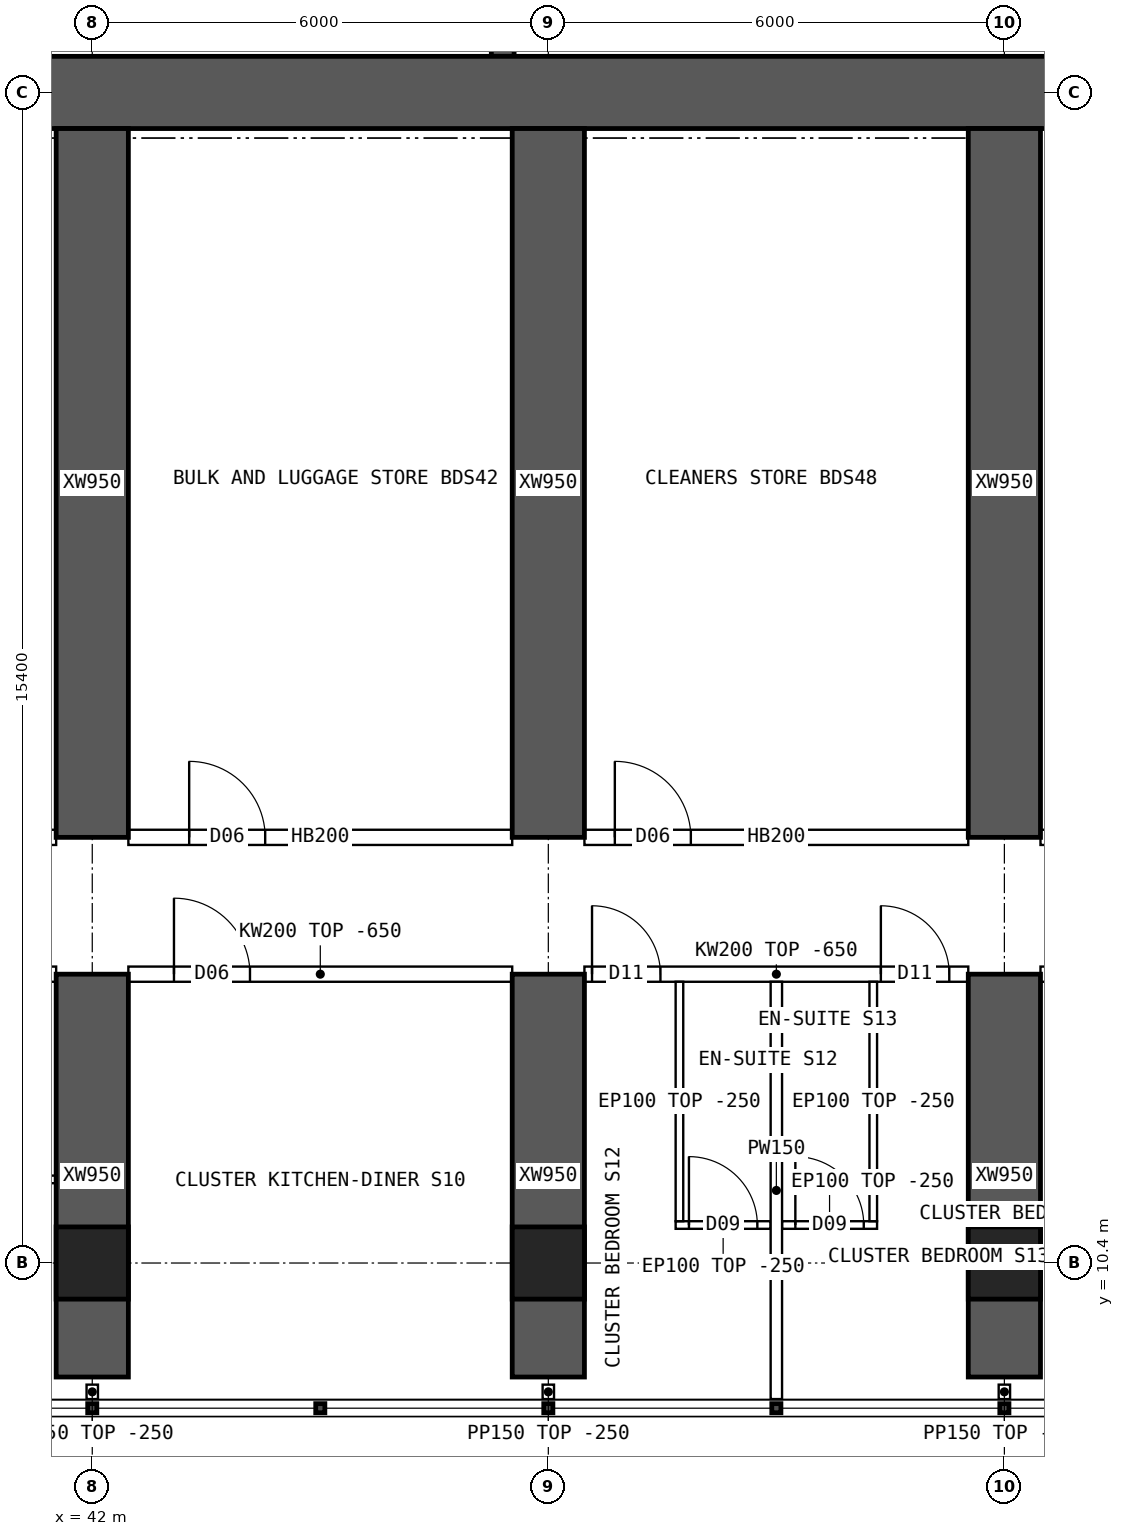
"""IFC4 building model, lengths in metres.
Left out: names, types, materials, properties, quantities, classifications, styles, units other than length and angle.
Written with IfcOpenShell. Run it as: python <this file> out.ifc"""

import sys

from ifc_helpers import new_model, si_unit, direction, frame, frame_2d, origin, origin_2d, place, context, subcontext, project, spatial, polyline, rectangle, hollow_rectangle, outline, extrude, element, fill, save


model = new_model("IFC4")
c1 = context("Model", 3, precision=1e-05, world=origin(), true_north=direction((0.0, 1.0)))
c2 = subcontext(c1, "Body", "Model", "MODEL_VIEW")
j1 = project(units=[si_unit("LENGTHUNIT", "METRE"), si_unit("PLANEANGLEUNIT", "RADIAN")], contexts=[c1])
p1 = place(None, origin())
s1 = spatial("IfcSite", under=j1, at=p1, CompositionType="ELEMENT")
p2 = place(p1, origin())
s2 = spatial("IfcBuilding", under=s1, at=p2, CompositionType="ELEMENT")
p3 = place(p2, frame((0.0, 0.0, 118.15)))
s3 = spatial("IfcBuildingStorey", under=s2, at=p3, CompositionType="ELEMENT", Elevation=118.15)
for number, where, z_axis, x_axis in (
    (1, (42.0, 10.4, 0.0), (0.0, 0.0, 1.0), (1.0, 0.0, 0.0)),
    (2, (48.0, 10.4, 0.0), (0.0, 0.0, 1.0), (1.0, 0.0, 0.0)),
    (3, (54.0, 10.4, 0.0), (0.0, 0.0, 1.0), (1.0, 0.0, 0.0)),
):
    element("IfcColumn", number, at=place(p3, frame(where, z_axis=z_axis, x_axis=x_axis)), inside=s3, PredefinedType="COLUMN", context=c2, shape_type="SweptSolid", body=[
        extrude(hollow_rectangle(XDim=0.95, YDim=0.95, WallThickness=0.095, at=origin_2d()), origin(), (0.0, 0.0, 1.0), 3.75),
    ])
p4 = place(p3, frame((18.0, 25.8, 0.0), z_axis=(0.0, 0.0, 1.0), x_axis=(1.0, 0.0, 0.0)))
e4 = element("IfcWall", 4, at=p4, inside=s3, PredefinedType="SHEAR", context=c2, shape_type="SweptSolid", body=[
    extrude(rectangle(XDim=48.0, YDim=0.95, at=frame_2d((24.0, 0.0))), origin(), (0.0, 0.0, 1.0), 3.75),
])
p5 = place(p3, frame((47.4, 26.275, 0.0), z_axis=(0.0, 0.0, 1.0), x_axis=(0.0, 1.0, 0.0)))
e5 = element("IfcWall", 5, at=p5, inside=s3, PredefinedType="SHEAR", context=c2, shape_type="SweptSolid", body=[
    extrude(rectangle(XDim=3.975, YDim=0.3, at=frame_2d((1.988, 0.0))), origin(), (0.0, 0.0, 1.0), 3.75),
])
p6 = place(p3, frame((42.0, 8.9, 0.0), z_axis=(0.0, 0.0, 1.0), x_axis=(0.0, 1.0, 0.0)))
e6 = element("IfcWall", 6, at=p6, inside=s3, PredefinedType="SHEAR", context=c2, shape_type="SweptSolid", body=[
    extrude(rectangle(XDim=5.3, YDim=0.95, at=frame_2d((2.65, 0.0))), origin(), (0.0, 0.0, 1.0), 3.75),
])
p7 = place(p3, frame((42.0, 16.0, 0.0), z_axis=(0.0, 0.0, 1.0), x_axis=(0.0, 1.0, 0.0)))
e7 = element("IfcWall", 7, at=p7, inside=s3, PredefinedType="SHEAR", context=c2, shape_type="SweptSolid", body=[
    extrude(rectangle(XDim=9.325, YDim=0.95, at=frame_2d((4.663, 0.0))), origin(), (0.0, 0.0, 1.0), 3.75),
])
p8 = place(p3, frame((48.0, 8.9, 0.0), z_axis=(0.0, 0.0, 1.0), x_axis=(0.0, 1.0, 0.0)))
e8 = element("IfcWall", 8, at=p8, inside=s3, PredefinedType="SHEAR", context=c2, shape_type="SweptSolid", body=[
    extrude(rectangle(XDim=5.3, YDim=0.95, at=frame_2d((2.65, 0.0))), origin(), (0.0, 0.0, 1.0), 3.75),
])
p9 = place(p3, frame((48.0, 16.0, 0.0), z_axis=(0.0, 0.0, 1.0), x_axis=(0.0, 1.0, 0.0)))
e9 = element("IfcWall", 9, at=p9, inside=s3, PredefinedType="SHEAR", context=c2, shape_type="SweptSolid", body=[
    extrude(rectangle(XDim=9.325, YDim=0.95, at=frame_2d((4.663, 0.0))), origin(), (0.0, 0.0, 1.0), 3.75),
])
p10 = place(p3, frame((54.0, 8.9, 0.0), z_axis=(0.0, 0.0, 1.0), x_axis=(0.0, 1.0, 0.0)))
e10 = element("IfcWall", 10, at=p10, inside=s3, PredefinedType="SHEAR", context=c2, shape_type="SweptSolid", body=[
    extrude(rectangle(XDim=5.3, YDim=0.95, at=frame_2d((2.65, 0.0))), origin(), (0.0, 0.0, 1.0), 3.75),
])
p11 = place(p3, frame((54.0, 16.0, 0.0), z_axis=(0.0, 0.0, 1.0), x_axis=(0.0, 1.0, 0.0)))
e11 = element("IfcWall", 11, at=p11, inside=s3, PredefinedType="SHEAR", context=c2, shape_type="SweptSolid", body=[
    extrude(rectangle(XDim=9.325, YDim=0.95, at=frame_2d((4.663, 0.0))), origin(), (0.0, 0.0, 1.0), 3.75),
])
p12 = place(p3, frame((36.475, 14.2, 0.0), z_axis=(0.0, 0.0, 1.0), x_axis=(1.0, 0.0, 0.0)))
e12 = element("IfcWall", 12, at=p12, inside=s3, PredefinedType="SOLIDWALL", context=c2, shape_type="SweptSolid", body=[
    extrude(outline(polyline([(0.0, 0.0), (5.05, 0.0), (5.05, 3.1), (0.0, 3.1), (0.0, 0.0)])), frame((0.0, 0.1, 0.0), z_axis=(0.0, -1.0, 0.0), x_axis=(1.0, 0.0, 0.0)), (0.0, 0.0, 1.0), 0.2),
])
p13 = place(p12, frame((0.3, 0.0, 0.0)))
e13 = element("IfcOpeningElement", 13, at=p13, cuts=e12, PredefinedType="OPENING", context=c2, shape_type="SweptSolid", body=[
    extrude(rectangle(XDim=1.0, YDim=2.1, at=frame_2d((0.5, 1.05))), frame((0.0, 0.11, 0.0), z_axis=(0.0, -1.0, 0.0), x_axis=(1.0, 0.0, 0.0)), (0.0, 0.0, 1.0), 0.22),
])
p14 = place(p3, frame((36.475, 16.0, 0.0), z_axis=(0.0, 0.0, 1.0), x_axis=(1.0, 0.0, 0.0)))
e14 = element("IfcWall", 14, at=p14, inside=s3, PredefinedType="SOLIDWALL", context=c2, shape_type="SweptSolid", body=[
    extrude(rectangle(XDim=5.05, YDim=0.2, at=frame_2d((2.525, 0.0))), origin(), (0.0, 0.0, 1.0), 3.5),
])
p15 = place(p14, frame((0.15, 0.0, 0.0)))
e15 = element("IfcOpeningElement", 15, at=p15, cuts=e14, PredefinedType="OPENING", context=c2, shape_type="SweptSolid", body=[
    extrude(rectangle(XDim=0.9, YDim=2.1, at=frame_2d((0.45, 1.05))), frame((0.0, 0.11, 0.0), z_axis=(0.0, -1.0, 0.0), x_axis=(1.0, 0.0, 0.0)), (0.0, 0.0, 1.0), 0.22),
])
p16 = place(p14, frame((2.615, 0.0, 0.0)))
e16 = element("IfcOpeningElement", 16, at=p16, cuts=e14, PredefinedType="OPENING", context=c2, shape_type="SweptSolid", body=[
    extrude(rectangle(XDim=0.9, YDim=2.1, at=frame_2d((0.45, 1.05))), frame((0.0, 0.11, 0.0), z_axis=(0.0, -1.0, 0.0), x_axis=(1.0, 0.0, 0.0)), (0.0, 0.0, 1.0), 0.22),
])
p17 = place(p3, frame((42.475, 14.2, 0.0), z_axis=(0.0, 0.0, 1.0), x_axis=(1.0, 0.0, 0.0)))
e17 = element("IfcWall", 17, at=p17, inside=s3, PredefinedType="SOLIDWALL", context=c2, shape_type="SweptSolid", body=[
    extrude(outline(polyline([(0.0, 0.0), (5.05, 0.0), (5.05, 3.1), (0.0, 3.1), (0.0, 0.0)])), frame((0.0, 0.1, 0.0), z_axis=(0.0, -1.0, 0.0), x_axis=(1.0, 0.0, 0.0)), (0.0, 0.0, 1.0), 0.2),
])
p18 = place(p17, frame((0.6, 0.0, 0.0)))
e18 = element("IfcOpeningElement", 18, at=p18, cuts=e17, PredefinedType="OPENING", context=c2, shape_type="SweptSolid", body=[
    extrude(rectangle(XDim=1.0, YDim=2.1, at=frame_2d((0.5, 1.05))), frame((0.0, 0.11, 0.0), z_axis=(0.0, -1.0, 0.0), x_axis=(1.0, 0.0, 0.0)), (0.0, 0.0, 1.0), 0.22),
])
p19 = place(p3, frame((42.475, 16.0, 0.0), z_axis=(0.0, 0.0, 1.0), x_axis=(1.0, 0.0, 0.0)))
e19 = element("IfcWall", 19, at=p19, inside=s3, PredefinedType="SOLIDWALL", context=c2, shape_type="SweptSolid", body=[
    extrude(rectangle(XDim=5.05, YDim=0.2, at=frame_2d((2.525, 0.0))), origin(), (0.0, 0.0, 1.0), 3.5),
])
p20 = place(p19, frame((0.8, 0.0, 0.0)))
e20 = element("IfcOpeningElement", 20, at=p20, cuts=e19, PredefinedType="OPENING", context=c2, shape_type="SweptSolid", body=[
    extrude(rectangle(XDim=1.0, YDim=2.1, at=frame_2d((0.5, 1.05))), frame((0.0, 0.11, 0.0), z_axis=(0.0, -1.0, 0.0), x_axis=(1.0, 0.0, 0.0)), (0.0, 0.0, 1.0), 0.22),
])
p21 = place(p3, frame((48.475, 14.2, 0.0), z_axis=(0.0, 0.0, 1.0), x_axis=(1.0, 0.0, 0.0)))
e21 = element("IfcWall", 21, at=p21, inside=s3, PredefinedType="SOLIDWALL", context=c2, shape_type="SweptSolid", body=[
    extrude(outline(polyline([(0.0, 0.0), (5.05, 0.0), (5.05, 3.1), (0.0, 3.1), (0.0, 0.0)])), frame((0.0, 0.1, 0.0), z_axis=(0.0, -1.0, 0.0), x_axis=(1.0, 0.0, 0.0)), (0.0, 0.0, 1.0), 0.2),
])
p22 = place(p21, frame((0.1, 0.0, 0.0)))
e22 = element("IfcOpeningElement", 22, at=p22, cuts=e21, PredefinedType="OPENING", context=c2, shape_type="SweptSolid", body=[
    extrude(rectangle(XDim=0.9, YDim=2.1, at=frame_2d((0.45, 1.05))), frame((0.0, 0.11, 0.0), z_axis=(0.0, -1.0, 0.0), x_axis=(1.0, 0.0, 0.0)), (0.0, 0.0, 1.0), 0.22),
])
p23 = place(p21, frame((3.9, 0.0, 0.0)))
e23 = element("IfcOpeningElement", 23, at=p23, cuts=e21, PredefinedType="OPENING", context=c2, shape_type="SweptSolid", body=[
    extrude(rectangle(XDim=0.9, YDim=2.1, at=frame_2d((0.45, 1.05))), frame((0.0, 0.11, 0.0), z_axis=(0.0, -1.0, 0.0), x_axis=(1.0, 0.0, 0.0)), (0.0, 0.0, 1.0), 0.22),
])
p24 = place(p3, frame((48.475, 16.0, 0.0), z_axis=(0.0, 0.0, 1.0), x_axis=(1.0, 0.0, 0.0)))
e24 = element("IfcWall", 24, at=p24, inside=s3, PredefinedType="SOLIDWALL", context=c2, shape_type="SweptSolid", body=[
    extrude(rectangle(XDim=5.05, YDim=0.2, at=frame_2d((2.525, 0.0))), origin(), (0.0, 0.0, 1.0), 3.5),
])
p25 = place(p24, frame((0.4, 0.0, 0.0)))
e25 = element("IfcOpeningElement", 25, at=p25, cuts=e24, PredefinedType="OPENING", context=c2, shape_type="SweptSolid", body=[
    extrude(rectangle(XDim=1.0, YDim=2.1, at=frame_2d((0.5, 1.05))), frame((0.0, 0.11, 0.0), z_axis=(0.0, -1.0, 0.0), x_axis=(1.0, 0.0, 0.0)), (0.0, 0.0, 1.0), 0.22),
])
p26 = place(p3, frame((54.475, 14.2, 0.0), z_axis=(0.0, 0.0, 1.0), x_axis=(1.0, 0.0, 0.0)))
e26 = element("IfcWall", 26, at=p26, inside=s3, PredefinedType="SOLIDWALL", context=c2, shape_type="SweptSolid", body=[
    extrude(outline(polyline([(0.0, 0.0), (5.05, 0.0), (5.05, 3.1), (0.0, 3.1), (0.0, 0.0)])), frame((0.0, 0.1, 0.0), z_axis=(0.0, -1.0, 0.0), x_axis=(1.0, 0.0, 0.0)), (0.0, 0.0, 1.0), 0.2),
])
p27 = place(p26, frame((0.1, 0.0, 0.0)))
e27 = element("IfcOpeningElement", 27, at=p27, cuts=e26, PredefinedType="OPENING", context=c2, shape_type="SweptSolid", body=[
    extrude(rectangle(XDim=0.9, YDim=2.1, at=frame_2d((0.45, 1.05))), frame((0.0, 0.11, 0.0), z_axis=(0.0, -1.0, 0.0), x_axis=(1.0, 0.0, 0.0)), (0.0, 0.0, 1.0), 0.22),
])
p28 = place(p26, frame((3.9, 0.0, 0.0)))
e28 = element("IfcOpeningElement", 28, at=p28, cuts=e26, PredefinedType="OPENING", context=c2, shape_type="SweptSolid", body=[
    extrude(rectangle(XDim=0.9, YDim=2.1, at=frame_2d((0.45, 1.05))), frame((0.0, 0.11, 0.0), z_axis=(0.0, -1.0, 0.0), x_axis=(1.0, 0.0, 0.0)), (0.0, 0.0, 1.0), 0.22),
])
p29 = place(p3, frame((54.475, 16.0, 0.0), z_axis=(0.0, 0.0, 1.0), x_axis=(1.0, 0.0, 0.0)))
e29 = element("IfcWall", 29, at=p29, inside=s3, PredefinedType="SOLIDWALL", context=c2, shape_type="SweptSolid", body=[
    extrude(rectangle(XDim=5.05, YDim=0.2, at=frame_2d((2.525, 0.0))), origin(), (0.0, 0.0, 1.0), 3.5),
])
p30 = place(p29, frame((0.35, 0.0, 0.0)))
e30 = element("IfcOpeningElement", 30, at=p30, cuts=e29, PredefinedType="OPENING", context=c2, shape_type="SweptSolid", body=[
    extrude(rectangle(XDim=0.9, YDim=2.1, at=frame_2d((0.45, 1.05))), frame((0.0, 0.11, 0.0), z_axis=(0.0, -1.0, 0.0), x_axis=(1.0, 0.0, 0.0)), (0.0, 0.0, 1.0), 0.22),
])
p31 = place(p29, frame((2.805, 0.0, 0.0)))
e31 = element("IfcOpeningElement", 31, at=p31, cuts=e29, PredefinedType="OPENING", context=c2, shape_type="SweptSolid", body=[
    extrude(rectangle(XDim=0.9, YDim=2.1, at=frame_2d((0.45, 1.05))), frame((0.0, 0.11, 0.0), z_axis=(0.0, -1.0, 0.0), x_axis=(1.0, 0.0, 0.0)), (0.0, 0.0, 1.0), 0.22),
])
p32 = place(p3, frame((38.875, 11.5, 0.0), z_axis=(0.0, 0.0, 1.0), x_axis=(1.0, 0.0, 0.0)))
e32 = element("IfcWall", 32, at=p32, inside=s3, PredefinedType="PARTITIONING", context=c2, shape_type="SweptSolid", body=[
    extrude(rectangle(XDim=2.65, YDim=0.1, at=frame_2d((1.325, 0.0))), origin(), (0.0, 0.0, 1.0), 3.5),
])
p33 = place(p3, frame((51.0, 8.61, 0.0), z_axis=(0.0, 0.0, 1.0), x_axis=(0.0, 1.0, 0.0)))
e33 = element("IfcWall", 33, at=p33, inside=s3, PredefinedType="PARTITIONING", context=c2, shape_type="SweptSolid", body=[
    extrude(outline(polyline([(0.0, 0.0), (5.49, 0.0), (5.49, 3.1), (5.442, 3.1), (5.44, 3.5), (1.992, 3.5), (1.99, 3.1), (1.592, 3.1), (1.59, 3.5), (0.0, 3.5), (0.0, 0.0)])), frame((0.0, 0.075, 0.0), z_axis=(0.0, -1.0, 0.0), x_axis=(1.0, 0.0, 0.0)), (0.0, 0.0, 1.0), 0.15),
])
p34 = place(p3, frame((50.925, 10.9, 0.0), z_axis=(0.0, 0.0, 1.0), x_axis=(-1.0, 0.0, 0.0)))
e34 = element("IfcWall", 34, at=p34, inside=s3, PredefinedType="PARTITIONING", context=c2, shape_type="SweptSolid", body=[
    extrude(rectangle(XDim=1.25, YDim=0.1, at=frame_2d((0.625, 0.0))), origin(), (0.0, 0.0, 1.0), 3.5),
])
p35 = place(p34, frame((0.175, 0.0, 0.0)))
e35 = element("IfcOpeningElement", 35, at=p35, cuts=e34, PredefinedType="OPENING", context=c2, shape_type="SweptSolid", body=[
    extrude(rectangle(XDim=0.9, YDim=2.1, at=frame_2d((0.45, 1.05))), frame((0.0, 0.06, 0.0), z_axis=(0.0, -1.0, 0.0), x_axis=(1.0, 0.0, 0.0)), (0.0, 0.0, 1.0), 0.12),
])
p36 = place(p3, frame((49.725, 10.95, 0.0), z_axis=(0.0, 0.0, 1.0), x_axis=(0.0, 1.0, 0.0)))
e36 = element("IfcWall", 36, at=p36, inside=s3, PredefinedType="PARTITIONING", context=c2, shape_type="SweptSolid", body=[
    extrude(outline(polyline([(0.0, 0.0), (3.15, 0.0), (3.15, 3.1), (3.102, 3.1), (3.1, 3.5), (0.0, 3.5), (0.0, 0.0)])), frame((0.0, 0.05, 0.0), z_axis=(0.0, -1.0, 0.0), x_axis=(1.0, 0.0, 0.0)), (0.0, 0.0, 1.0), 0.1),
])
p37 = place(p3, frame((52.325, 10.9, 0.0), z_axis=(0.0, 0.0, 1.0), x_axis=(-1.0, 0.0, 0.0)))
e37 = element("IfcWall", 37, at=p37, inside=s3, PredefinedType="PARTITIONING", context=c2, shape_type="SweptSolid", body=[
    extrude(rectangle(XDim=1.25, YDim=0.1, at=frame_2d((0.625, 0.0))), origin(), (0.0, 0.0, 1.0), 3.5),
])
p38 = place(p37, frame((0.175, 0.0, 0.0)))
e38 = element("IfcOpeningElement", 38, at=p38, cuts=e37, PredefinedType="OPENING", context=c2, shape_type="SweptSolid", body=[
    extrude(rectangle(XDim=0.9, YDim=2.1, at=frame_2d((0.45, 1.05))), frame((0.0, 0.06, 0.0), z_axis=(0.0, -1.0, 0.0), x_axis=(1.0, 0.0, 0.0)), (0.0, 0.0, 1.0), 0.12),
])
p39 = place(p3, frame((52.275, 10.95, 0.0), z_axis=(0.0, 0.0, 1.0), x_axis=(0.0, 1.0, 0.0)))
e39 = element("IfcWall", 39, at=p39, inside=s3, PredefinedType="PARTITIONING", context=c2, shape_type="SweptSolid", body=[
    extrude(outline(polyline([(0.0, 0.0), (3.15, 0.0), (3.15, 3.1), (3.102, 3.1), (3.1, 3.5), (0.0, 3.5), (0.0, 0.0)])), frame((0.0, 0.05, 0.0), z_axis=(0.0, -1.0, 0.0), x_axis=(1.0, 0.0, 0.0)), (0.0, 0.0, 1.0), 0.1),
])
for number, where, z_axis, x_axis in (
    (40, (42.0, 8.8, 0.0), (0.0, 0.0, 1.0), (0.0, -1.0, 0.0)),
    (41, (48.0, 8.8, 0.0), (0.0, 0.0, 1.0), (0.0, -1.0, 0.0)),
    (42, (54.0, 8.8, 0.0), (0.0, 0.0, 1.0), (0.0, -1.0, 0.0)),
):
    element("IfcWall", number, at=place(p3, frame(where, z_axis=z_axis, x_axis=x_axis)), inside=s3, PredefinedType="PARTITIONING", context=c2, shape_type="SweptSolid", body=[
        extrude(rectangle(XDim=0.19, YDim=0.15, at=frame_2d((0.095, 0.0))), origin(), (0.0, 0.0, 1.0), 3.5),
    ])
p40 = place(p18, origin())
e43 = element("IfcDoor", 43, at=p40, inside=s3, OperationType="SINGLE_SWING_LEFT", PredefinedType="DOOR", context=c2, shape_type="SweptSolid", body=[
    extrude(rectangle(XDim=1.0, YDim=2.1, at=frame_2d((0.5, 1.05))), frame((0.0, 0.025, 0.0), z_axis=(0.0, -1.0, 0.0), x_axis=(1.0, 0.0, 0.0)), (0.0, 0.0, 1.0), 0.05),
])
fill(e18, e43)
p41 = place(p35, origin())
e44 = element("IfcDoor", 44, at=p41, inside=s3, OperationType="SINGLE_SWING_RIGHT", PredefinedType="DOOR", context=c2, shape_type="SweptSolid", body=[
    extrude(rectangle(XDim=0.9, YDim=2.1, at=frame_2d((0.45, 1.05))), frame((0.0, 0.025, 0.0), z_axis=(0.0, -1.0, 0.0), x_axis=(1.0, 0.0, 0.0)), (0.0, 0.0, 1.0), 0.05),
])
fill(e35, e44)
p42 = place(p22, origin())
e45 = element("IfcDoor", 45, at=p42, inside=s3, OperationType="SINGLE_SWING_LEFT", PredefinedType="DOOR", context=c2, shape_type="SweptSolid", body=[
    extrude(rectangle(XDim=0.9, YDim=2.1, at=frame_2d((0.45, 1.05))), frame((0.0, 0.025, 0.0), z_axis=(0.0, -1.0, 0.0), x_axis=(1.0, 0.0, 0.0)), (0.0, 0.0, 1.0), 0.05),
])
fill(e22, e45)
p43 = place(p38, origin())
e46 = element("IfcDoor", 46, at=p43, inside=s3, OperationType="SINGLE_SWING_RIGHT", PredefinedType="DOOR", context=c2, shape_type="SweptSolid", body=[
    extrude(rectangle(XDim=0.9, YDim=2.1, at=frame_2d((0.45, 1.05))), frame((0.0, 0.025, 0.0), z_axis=(0.0, -1.0, 0.0), x_axis=(1.0, 0.0, 0.0)), (0.0, 0.0, 1.0), 0.05),
])
fill(e38, e46)
p44 = place(p23, origin())
e47 = element("IfcDoor", 47, at=p44, inside=s3, OperationType="SINGLE_SWING_LEFT", PredefinedType="DOOR", context=c2, shape_type="SweptSolid", body=[
    extrude(rectangle(XDim=0.9, YDim=2.1, at=frame_2d((0.45, 1.05))), frame((0.0, 0.025, 0.0), z_axis=(0.0, -1.0, 0.0), x_axis=(1.0, 0.0, 0.0)), (0.0, 0.0, 1.0), 0.05),
])
fill(e23, e47)
p45 = place(p20, origin())
e48 = element("IfcDoor", 48, at=p45, inside=s3, OperationType="SINGLE_SWING_LEFT", PredefinedType="DOOR", context=c2, shape_type="SweptSolid", body=[
    extrude(rectangle(XDim=1.0, YDim=2.1, at=frame_2d((0.5, 1.05))), frame((0.0, 0.025, 0.0), z_axis=(0.0, -1.0, 0.0), x_axis=(1.0, 0.0, 0.0)), (0.0, 0.0, 1.0), 0.05),
])
fill(e20, e48)
p46 = place(p25, origin())
e49 = element("IfcDoor", 49, at=p46, inside=s3, OperationType="SINGLE_SWING_LEFT", PredefinedType="DOOR", context=c2, shape_type="SweptSolid", body=[
    extrude(rectangle(XDim=1.0, YDim=2.1, at=frame_2d((0.5, 1.05))), frame((0.0, 0.025, 0.0), z_axis=(0.0, -1.0, 0.0), x_axis=(1.0, 0.0, 0.0)), (0.0, 0.0, 1.0), 0.05),
])
fill(e25, e49)
save(model, sys.argv[1])
